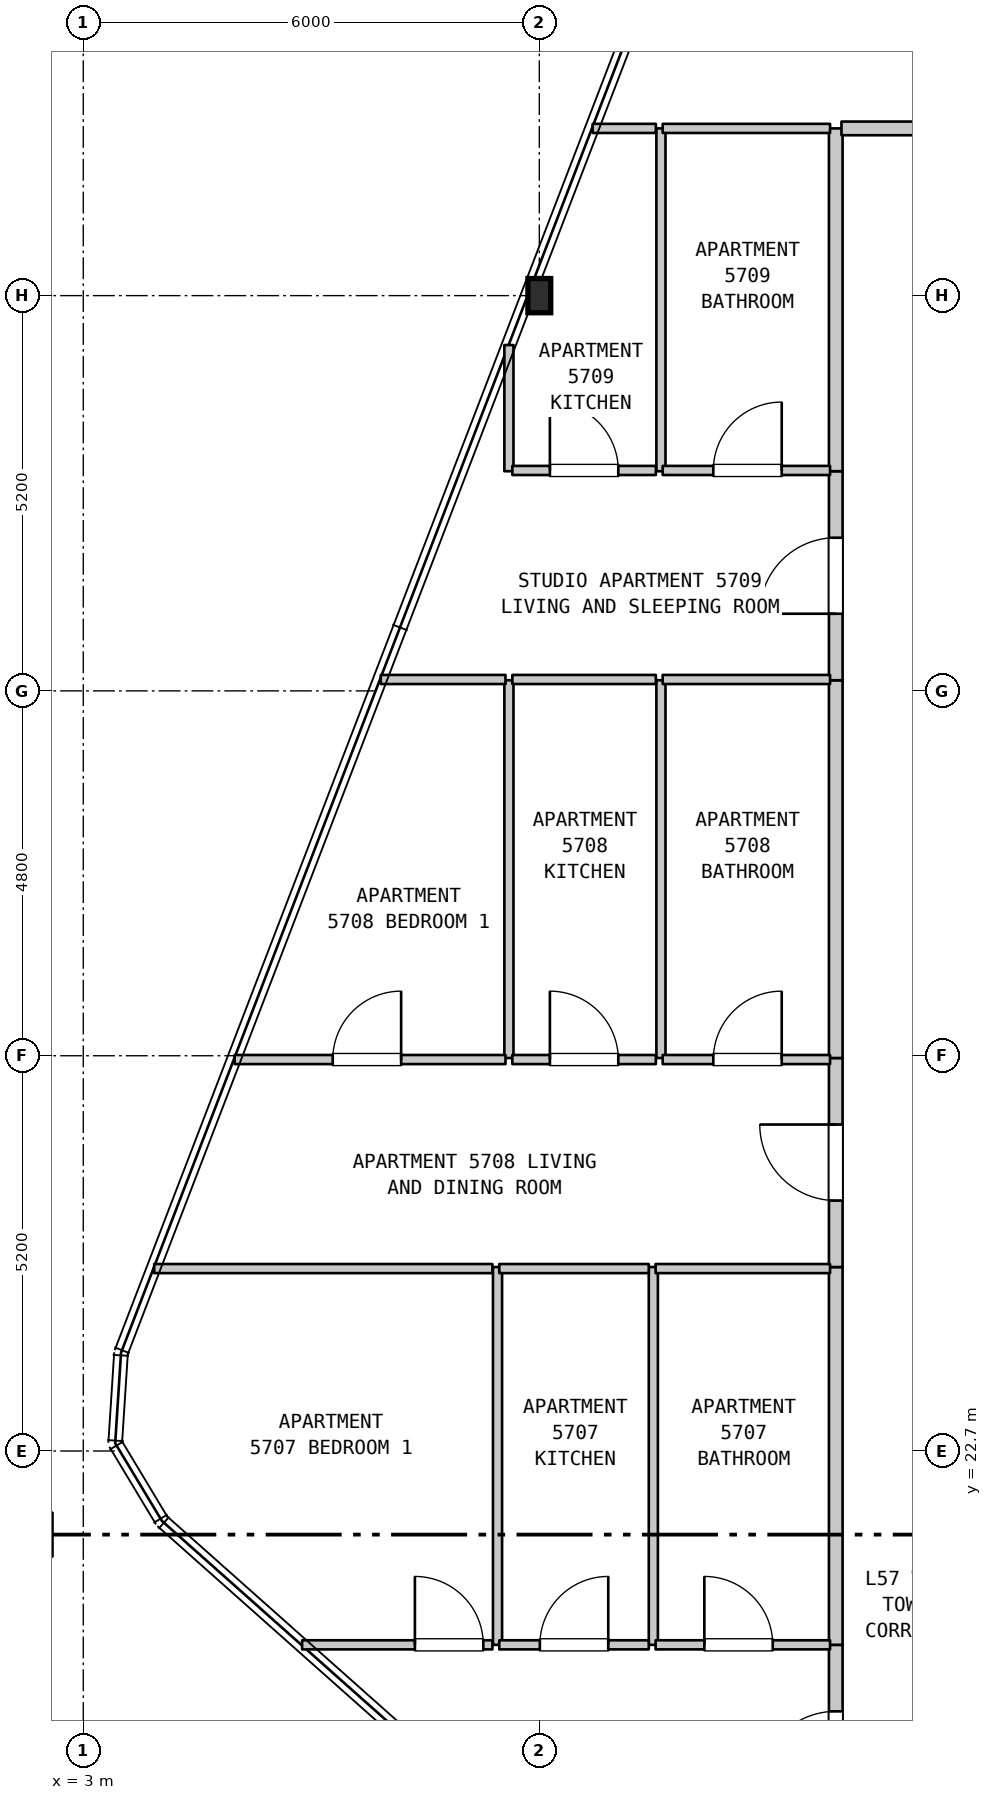
"""IFC4 building model, lengths in metres.
Left out: names, types, materials, properties, quantities, classifications, styles, units other than length and angle.
Written with IfcOpenShell. Run it as: python <this file> out.ifc"""

import sys

from ifc_helpers import new_model, si_unit, direction, frame, frame_2d, origin, origin_2d, place, context, subcontext, project, spatial, rectangle, i_section, extrude, element, fill, save


model = new_model("IFC4")
c1 = context("Model", 3, precision=1e-05, world=origin(), true_north=direction((0.0, 1.0)))
c2 = subcontext(c1, "Body", "Model", "MODEL_VIEW")
j1 = project(units=[si_unit("LENGTHUNIT", "METRE"), si_unit("PLANEANGLEUNIT", "RADIAN")], contexts=[c1])
p1 = place(None, origin())
s1 = spatial("IfcSite", under=j1, at=p1, CompositionType="ELEMENT")
p2 = place(p1, origin())
s2 = spatial("IfcBuilding", under=s1, at=p2, CompositionType="ELEMENT")
p3 = place(p2, frame((0.0, 0.0, 230.2)))
s3 = spatial("IfcBuildingStorey", under=s2, at=p3, CompositionType="ELEMENT", Elevation=230.2)
p4 = place(p3, frame((9.0, 37.9, 0.0), z_axis=(0.0, 0.0, 1.0), x_axis=(1.0, 0.0, 0.0)))
e1 = element("IfcColumn", 1, at=p4, inside=s3, PredefinedType="COLUMN", context=c2, shape_type="SweptSolid", body=[
    extrude(i_section(OverallWidth=0.3, OverallDepth=0.45, WebThickness=0.014, FlangeThickness=0.026, FilletRadius=0.027, at=origin_2d()), origin(), (0.0, 0.0, 1.0), 3.7),
])
p5 = place(p3, frame((8.45, 20.15, 0.0), z_axis=(0.0, 0.0, 1.0), x_axis=(0.0, 1.0, 0.0)))
e2 = element("IfcWall", 2, at=p5, inside=s3, PredefinedType="PARTITIONING", context=c2, shape_type="SweptSolid", body=[
    extrude(rectangle(XDim=4.97, YDim=0.12, at=frame_2d((2.485, 0.0))), origin(), (0.0, 0.0, 1.0), 3.39),
])
p6 = place(p3, frame((8.6, 27.87, 0.0), z_axis=(0.0, 0.0, 1.0), x_axis=(0.0, 1.0, 0.0)))
e3 = element("IfcWall", 3, at=p6, inside=s3, PredefinedType="PARTITIONING", context=c2, shape_type="SweptSolid", body=[
    extrude(rectangle(XDim=4.97, YDim=0.12, at=frame_2d((2.485, 0.0))), origin(), (0.0, 0.0, 1.0), 3.39),
])
p7 = place(p3, frame((8.6, 35.59, 0.0), z_axis=(0.0, 0.0, 1.0), x_axis=(0.0, 1.0, 0.0)))
e4 = element("IfcWall", 4, at=p7, inside=s3, PredefinedType="PARTITIONING", context=c2, shape_type="SweptSolid", body=[
    extrude(rectangle(XDim=1.66, YDim=0.12, at=frame_2d((0.83, 0.0))), origin(), (0.0, 0.0, 1.0), 3.39),
])
p8 = place(p3, frame((10.5, 20.15, 0.0), z_axis=(0.0, 0.0, 1.0), x_axis=(0.0, 1.0, 0.0)))
e5 = element("IfcWall", 5, at=p8, inside=s3, PredefinedType="PARTITIONING", context=c2, shape_type="SweptSolid", body=[
    extrude(rectangle(XDim=4.97, YDim=0.12, at=frame_2d((2.485, 0.0))), origin(), (0.0, 0.0, 1.0), 3.39),
])
p9 = place(p3, frame((10.6, 27.87, 0.0), z_axis=(0.0, 0.0, 1.0), x_axis=(0.0, 1.0, 0.0)))
e6 = element("IfcWall", 6, at=p9, inside=s3, PredefinedType="PARTITIONING", context=c2, shape_type="SweptSolid", body=[
    extrude(rectangle(XDim=4.97, YDim=0.12, at=frame_2d((2.485, 0.0))), origin(), (0.0, 0.0, 1.0), 3.39),
])
p10 = place(p3, frame((10.6, 35.59, 0.0), z_axis=(0.0, 0.0, 1.0), x_axis=(0.0, 1.0, 0.0)))
e7 = element("IfcWall", 7, at=p10, inside=s3, PredefinedType="PARTITIONING", context=c2, shape_type="SweptSolid", body=[
    extrude(rectangle(XDim=4.51, YDim=0.12, at=frame_2d((2.255, 0.0))), origin(), (0.0, 0.0, 1.0), 3.39),
])
p11 = place(p3, frame((12.9, 17.4, 0.0), z_axis=(0.0, 0.0, 1.0), x_axis=(0.0, 1.0, 0.0)))
e8 = element("IfcWall", 8, at=p11, inside=s3, PredefinedType="STANDARD", context=c2, shape_type="SweptSolid", body=[
    extrude(rectangle(XDim=2.75, YDim=0.18, at=frame_2d((1.375, 0.0))), origin(), (0.0, 0.0, 1.0), 3.39),
])
p12 = place(p11, frame((0.875, 0.0, 0.0)))
e9 = element("IfcOpeningElement", 9, at=p12, cuts=e8, PredefinedType="OPENING", context=c2, shape_type="SweptSolid", body=[
    extrude(rectangle(XDim=1.0, YDim=2.15, at=frame_2d((0.5, 1.075))), frame((0.0, 0.1, 0.0), z_axis=(0.0, -1.0, 0.0), x_axis=(1.0, 0.0, 0.0)), (0.0, 0.0, 1.0), 0.2),
])
p13 = place(p3, frame((12.9, 20.15, 0.0), z_axis=(0.0, 0.0, 1.0), x_axis=(0.0, 1.0, 0.0)))
e10 = element("IfcWall", 10, at=p13, inside=s3, PredefinedType="STANDARD", context=c2, shape_type="SweptSolid", body=[
    extrude(rectangle(XDim=4.97, YDim=0.18, at=frame_2d((2.485, 0.0))), origin(), (0.0, 0.0, 1.0), 3.39),
])
p14 = place(p3, frame((12.9, 25.12, 0.0), z_axis=(0.0, 0.0, 1.0), x_axis=(0.0, 1.0, 0.0)))
e11 = element("IfcWall", 11, at=p14, inside=s3, PredefinedType="STANDARD", context=c2, shape_type="SweptSolid", body=[
    extrude(rectangle(XDim=2.75, YDim=0.18, at=frame_2d((1.375, 0.0))), origin(), (0.0, 0.0, 1.0), 3.39),
])
p15 = place(p14, frame((0.875, 0.0, 0.0)))
e12 = element("IfcOpeningElement", 12, at=p15, cuts=e11, PredefinedType="OPENING", context=c2, shape_type="SweptSolid", body=[
    extrude(rectangle(XDim=1.0, YDim=2.15, at=frame_2d((0.5, 1.075))), frame((0.0, 0.1, 0.0), z_axis=(0.0, -1.0, 0.0), x_axis=(1.0, 0.0, 0.0)), (0.0, 0.0, 1.0), 0.2),
])
p16 = place(p3, frame((12.9, 27.87, 0.0), z_axis=(0.0, 0.0, 1.0), x_axis=(0.0, 1.0, 0.0)))
e13 = element("IfcWall", 13, at=p16, inside=s3, PredefinedType="STANDARD", context=c2, shape_type="SweptSolid", body=[
    extrude(rectangle(XDim=4.97, YDim=0.18, at=frame_2d((2.485, 0.0))), origin(), (0.0, 0.0, 1.0), 3.39),
])
p17 = place(p3, frame((12.9, 32.84, 0.0), z_axis=(0.0, 0.0, 1.0), x_axis=(0.0, 1.0, 0.0)))
e14 = element("IfcWall", 14, at=p17, inside=s3, PredefinedType="STANDARD", context=c2, shape_type="SweptSolid", body=[
    extrude(rectangle(XDim=2.75, YDim=0.18, at=frame_2d((1.375, 0.0))), origin(), (0.0, 0.0, 1.0), 3.39),
])
p18 = place(p17, frame((0.875, 0.0, 0.0)))
e15 = element("IfcOpeningElement", 15, at=p18, cuts=e14, PredefinedType="OPENING", context=c2, shape_type="SweptSolid", body=[
    extrude(rectangle(XDim=1.0, YDim=2.15, at=frame_2d((0.5, 1.075))), frame((0.0, 0.1, 0.0), z_axis=(0.0, -1.0, 0.0), x_axis=(1.0, 0.0, 0.0)), (0.0, 0.0, 1.0), 0.2),
])
p19 = place(p3, frame((12.9, 35.59, 0.0), z_axis=(0.0, 0.0, 1.0), x_axis=(0.0, 1.0, 0.0)))
e16 = element("IfcWall", 16, at=p19, inside=s3, PredefinedType="STANDARD", context=c2, shape_type="SweptSolid", body=[
    extrude(rectangle(XDim=4.51, YDim=0.18, at=frame_2d((2.255, 0.0))), origin(), (0.0, 0.0, 1.0), 3.39),
])
p20 = place(p3, frame((5.879, 20.15, 0.0), z_axis=(0.0, 0.0, 1.0), x_axis=(1.0, 0.0, 0.0)))
e17 = element("IfcWall", 17, at=p20, inside=s3, PredefinedType="PARTITIONING", context=c2, shape_type="SweptSolid", body=[
    extrude(rectangle(XDim=2.504, YDim=0.12, at=frame_2d((1.252, 0.0))), origin(), (0.0, 0.0, 1.0), 3.39),
])
p21 = place(p20, frame((1.484, 0.0, 0.0)))
e18 = element("IfcOpeningElement", 18, at=p21, cuts=e17, PredefinedType="OPENING", context=c2, shape_type="SweptSolid", body=[
    extrude(rectangle(XDim=0.9, YDim=2.15, at=frame_2d((0.45, 1.075))), frame((0.0, 0.07, 0.0), z_axis=(0.0, -1.0, 0.0), x_axis=(1.0, 0.0, 0.0)), (0.0, 0.0, 1.0), 0.14),
])
p22 = place(p3, frame((8.473, 20.15, 0.0), z_axis=(0.0, 0.0, 1.0), x_axis=(1.0, 0.0, 0.0)))
e19 = element("IfcWall", 19, at=p22, inside=s3, PredefinedType="PARTITIONING", context=c2, shape_type="SweptSolid", body=[
    extrude(rectangle(XDim=1.967, YDim=0.12, at=frame_2d((0.983, 0.0))), origin(), (0.0, 0.0, 1.0), 3.39),
])
p23 = place(p22, frame((0.534, 0.0, 0.0)))
e20 = element("IfcOpeningElement", 20, at=p23, cuts=e19, PredefinedType="OPENING", context=c2, shape_type="SweptSolid", body=[
    extrude(rectangle(XDim=0.9, YDim=2.15, at=frame_2d((0.45, 1.075))), frame((0.0, 0.07, 0.0), z_axis=(0.0, -1.0, 0.0), x_axis=(1.0, 0.0, 0.0)), (0.0, 0.0, 1.0), 0.14),
])
p24 = place(p3, frame((10.53, 20.15, 0.0), z_axis=(0.0, 0.0, 1.0), x_axis=(1.0, 0.0, 0.0)))
e21 = element("IfcWall", 21, at=p24, inside=s3, PredefinedType="PARTITIONING", context=c2, shape_type="SweptSolid", body=[
    extrude(rectangle(XDim=2.295, YDim=0.12, at=frame_2d((1.147, 0.0))), origin(), (0.0, 0.0, 1.0), 3.39),
])
p25 = place(p24, frame((0.641, 0.0, 0.0)))
e22 = element("IfcOpeningElement", 22, at=p25, cuts=e21, PredefinedType="OPENING", context=c2, shape_type="SweptSolid", body=[
    extrude(rectangle(XDim=0.9, YDim=2.1, at=frame_2d((0.45, 1.05))), frame((0.0, 0.07, 0.0), z_axis=(0.0, -1.0, 0.0), x_axis=(1.0, 0.0, 0.0)), (0.0, 0.0, 1.0), 0.14),
])
p26 = place(p3, frame((3.933, 25.1, 0.0), z_axis=(0.0, 0.0, 1.0), x_axis=(1.0, 0.0, 0.0)))
e23 = element("IfcWall", 23, at=p26, inside=s3, PredefinedType="PARTITIONING", context=c2, shape_type="SweptSolid", body=[
    extrude(rectangle(XDim=4.45, YDim=0.12, at=frame_2d((2.225, 0.0))), origin(), (0.0, 0.0, 1.0), 3.39),
])
p27 = place(p3, frame((8.473, 25.1, 0.0), z_axis=(0.0, 0.0, 1.0), x_axis=(1.0, 0.0, 0.0)))
e24 = element("IfcWall", 24, at=p27, inside=s3, PredefinedType="PARTITIONING", context=c2, shape_type="SweptSolid", body=[
    extrude(rectangle(XDim=1.967, YDim=0.12, at=frame_2d((0.983, 0.0))), origin(), (0.0, 0.0, 1.0), 3.39),
])
p28 = place(p3, frame((10.53, 25.1, 0.0), z_axis=(0.0, 0.0, 1.0), x_axis=(1.0, 0.0, 0.0)))
e25 = element("IfcWall", 25, at=p28, inside=s3, PredefinedType="PARTITIONING", context=c2, shape_type="SweptSolid", body=[
    extrude(rectangle(XDim=2.295, YDim=0.12, at=frame_2d((1.147, 0.0))), origin(), (0.0, 0.0, 1.0), 3.39),
])
p29 = place(p3, frame((4.991, 27.85, 0.0), z_axis=(0.0, 0.0, 1.0), x_axis=(1.0, 0.0, 0.0)))
e26 = element("IfcWall", 26, at=p29, inside=s3, PredefinedType="PARTITIONING", context=c2, shape_type="SweptSolid", body=[
    extrude(rectangle(XDim=3.564, YDim=0.12, at=frame_2d((1.782, 0.0))), origin(), (0.0, 0.0, 1.0), 3.39),
])
p30 = place(p29, frame((1.291, 0.0, 0.0)))
e27 = element("IfcOpeningElement", 27, at=p30, cuts=e26, PredefinedType="OPENING", context=c2, shape_type="SweptSolid", body=[
    extrude(rectangle(XDim=0.9, YDim=2.15, at=frame_2d((0.45, 1.075))), frame((0.0, 0.07, 0.0), z_axis=(0.0, -1.0, 0.0), x_axis=(1.0, 0.0, 0.0)), (0.0, 0.0, 1.0), 0.14),
])
p31 = place(p3, frame((8.645, 27.85, 0.0), z_axis=(0.0, 0.0, 1.0), x_axis=(1.0, 0.0, 0.0)))
e28 = element("IfcWall", 28, at=p31, inside=s3, PredefinedType="PARTITIONING", context=c2, shape_type="SweptSolid", body=[
    extrude(rectangle(XDim=1.888, YDim=0.12, at=frame_2d((0.944, 0.0))), origin(), (0.0, 0.0, 1.0), 3.39),
])
p32 = place(p31, frame((0.494, 0.0, 0.0)))
e29 = element("IfcOpeningElement", 29, at=p32, cuts=e28, PredefinedType="OPENING", context=c2, shape_type="SweptSolid", body=[
    extrude(rectangle(XDim=0.9, YDim=2.15, at=frame_2d((0.45, 1.075))), frame((0.0, 0.07, 0.0), z_axis=(0.0, -1.0, 0.0), x_axis=(1.0, 0.0, 0.0)), (0.0, 0.0, 1.0), 0.14),
])
p33 = place(p3, frame((10.623, 27.85, 0.0), z_axis=(0.0, 0.0, 1.0), x_axis=(1.0, 0.0, 0.0)))
e30 = element("IfcWall", 30, at=p33, inside=s3, PredefinedType="PARTITIONING", context=c2, shape_type="SweptSolid", body=[
    extrude(rectangle(XDim=2.202, YDim=0.12, at=frame_2d((1.101, 0.0))), origin(), (0.0, 0.0, 1.0), 3.39),
])
p34 = place(p33, frame((0.666, 0.0, 0.0)))
e31 = element("IfcOpeningElement", 31, at=p34, cuts=e30, PredefinedType="OPENING", context=c2, shape_type="SweptSolid", body=[
    extrude(rectangle(XDim=0.9, YDim=2.1, at=frame_2d((0.45, 1.05))), frame((0.0, 0.07, 0.0), z_axis=(0.0, -1.0, 0.0), x_axis=(1.0, 0.0, 0.0)), (0.0, 0.0, 1.0), 0.14),
])
p35 = place(p3, frame((6.914, 32.85, 0.0), z_axis=(0.0, 0.0, 1.0), x_axis=(1.0, 0.0, 0.0)))
e32 = element("IfcWall", 32, at=p35, inside=s3, PredefinedType="PARTITIONING", context=c2, shape_type="SweptSolid", body=[
    extrude(rectangle(XDim=1.641, YDim=0.12, at=frame_2d((0.82, 0.0))), origin(), (0.0, 0.0, 1.0), 3.39),
])
p36 = place(p3, frame((8.645, 32.85, 0.0), z_axis=(0.0, 0.0, 1.0), x_axis=(1.0, 0.0, 0.0)))
e33 = element("IfcWall", 33, at=p36, inside=s3, PredefinedType="PARTITIONING", context=c2, shape_type="SweptSolid", body=[
    extrude(rectangle(XDim=1.888, YDim=0.12, at=frame_2d((0.944, 0.0))), origin(), (0.0, 0.0, 1.0), 3.39),
])
p37 = place(p3, frame((10.623, 32.85, 0.0), z_axis=(0.0, 0.0, 1.0), x_axis=(1.0, 0.0, 0.0)))
e34 = element("IfcWall", 34, at=p37, inside=s3, PredefinedType="PARTITIONING", context=c2, shape_type="SweptSolid", body=[
    extrude(rectangle(XDim=2.202, YDim=0.12, at=frame_2d((1.101, 0.0))), origin(), (0.0, 0.0, 1.0), 3.39),
])
p38 = place(p3, frame((8.645, 35.6, 0.0), z_axis=(0.0, 0.0, 1.0), x_axis=(1.0, 0.0, 0.0)))
e35 = element("IfcWall", 35, at=p38, inside=s3, PredefinedType="PARTITIONING", context=c2, shape_type="SweptSolid", body=[
    extrude(rectangle(XDim=1.888, YDim=0.12, at=frame_2d((0.944, 0.0))), origin(), (0.0, 0.0, 1.0), 3.39),
])
p39 = place(p38, frame((0.494, 0.0, 0.0)))
e36 = element("IfcOpeningElement", 36, at=p39, cuts=e35, PredefinedType="OPENING", context=c2, shape_type="SweptSolid", body=[
    extrude(rectangle(XDim=0.9, YDim=2.15, at=frame_2d((0.45, 1.075))), frame((0.0, 0.07, 0.0), z_axis=(0.0, -1.0, 0.0), x_axis=(1.0, 0.0, 0.0)), (0.0, 0.0, 1.0), 0.14),
])
p40 = place(p3, frame((10.623, 35.6, 0.0), z_axis=(0.0, 0.0, 1.0), x_axis=(1.0, 0.0, 0.0)))
e37 = element("IfcWall", 37, at=p40, inside=s3, PredefinedType="PARTITIONING", context=c2, shape_type="SweptSolid", body=[
    extrude(rectangle(XDim=2.202, YDim=0.12, at=frame_2d((1.101, 0.0))), origin(), (0.0, 0.0, 1.0), 3.39),
])
p41 = place(p40, frame((0.666, 0.0, 0.0)))
e38 = element("IfcOpeningElement", 38, at=p41, cuts=e37, PredefinedType="OPENING", context=c2, shape_type="SweptSolid", body=[
    extrude(rectangle(XDim=0.9, YDim=2.1, at=frame_2d((0.45, 1.05))), frame((0.0, 0.07, 0.0), z_axis=(0.0, -1.0, 0.0), x_axis=(1.0, 0.0, 0.0)), (0.0, 0.0, 1.0), 0.14),
])
p42 = place(p3, frame((9.702, 40.1, 0.0), z_axis=(0.0, 0.0, 1.0), x_axis=(1.0, 0.0, 0.0)))
e39 = element("IfcWall", 39, at=p42, inside=s3, PredefinedType="PARTITIONING", context=c2, shape_type="SweptSolid", body=[
    extrude(rectangle(XDim=0.831, YDim=0.12, at=frame_2d((0.416, 0.0))), origin(), (0.0, 0.0, 1.0), 3.39),
])
p43 = place(p3, frame((10.623, 40.1, 0.0), z_axis=(0.0, 0.0, 1.0), x_axis=(1.0, 0.0, 0.0)))
e40 = element("IfcWall", 40, at=p43, inside=s3, PredefinedType="PARTITIONING", context=c2, shape_type="SweptSolid", body=[
    extrude(rectangle(XDim=2.202, YDim=0.12, at=frame_2d((1.101, 0.0))), origin(), (0.0, 0.0, 1.0), 3.39),
])
p44 = place(p3, frame((12.975, 40.1, 0.0), z_axis=(0.0, 0.0, 1.0), x_axis=(1.0, 0.0, 0.0)))
e41 = element("IfcWall", 41, at=p44, inside=s3, PredefinedType="STANDARD", context=c2, shape_type="SweptSolid", body=[
    extrude(rectangle(XDim=4.58, YDim=0.18, at=frame_2d((2.29, 0.0))), origin(), (0.0, 0.0, 1.0), 3.39),
])
p45 = place(p44, frame((1.775, 0.0, 0.0)))
e42 = element("IfcOpeningElement", 42, at=p45, cuts=e41, PredefinedType="OPENING", context=c2, shape_type="SweptSolid", body=[
    extrude(rectangle(XDim=1.0, YDim=2.15, at=frame_2d((0.5, 1.075))), frame((0.0, 0.1, 0.0), z_axis=(0.0, -1.0, 0.0), x_axis=(1.0, 0.0, 0.0)), (0.0, 0.0, 1.0), 0.2),
])
p46 = place(p12, origin())
e43 = element("IfcDoor", 43, at=p46, inside=s3, OperationType="SINGLE_SWING_LEFT", PredefinedType="DOOR", context=c2, shape_type="SweptSolid", body=[
    extrude(rectangle(XDim=1.0, YDim=2.15, at=frame_2d((0.5, 1.075))), frame((0.0, 0.025, 0.0), z_axis=(0.0, -1.0, 0.0), x_axis=(1.0, 0.0, 0.0)), (0.0, 0.0, 1.0), 0.05),
])
fill(e9, e43)
p47 = place(p15, origin())
e44 = element("IfcDoor", 44, at=p47, inside=s3, OperationType="SINGLE_SWING_RIGHT", PredefinedType="DOOR", context=c2, shape_type="SweptSolid", body=[
    extrude(rectangle(XDim=1.0, YDim=2.15, at=frame_2d((0.5, 1.075))), frame((0.0, 0.025, 0.0), z_axis=(0.0, -1.0, 0.0), x_axis=(1.0, 0.0, 0.0)), (0.0, 0.0, 1.0), 0.05),
])
fill(e12, e44)
p48 = place(p18, origin())
e45 = element("IfcDoor", 45, at=p48, inside=s3, OperationType="SINGLE_SWING_LEFT", PredefinedType="DOOR", context=c2, shape_type="SweptSolid", body=[
    extrude(rectangle(XDim=1.0, YDim=2.15, at=frame_2d((0.5, 1.075))), frame((0.0, 0.025, 0.0), z_axis=(0.0, -1.0, 0.0), x_axis=(1.0, 0.0, 0.0)), (0.0, 0.0, 1.0), 0.05),
])
fill(e15, e45)
p49 = place(p21, origin())
e46 = element("IfcDoor", 46, at=p49, inside=s3, OperationType="SINGLE_SWING_LEFT", PredefinedType="DOOR", context=c2, shape_type="SweptSolid", body=[
    extrude(rectangle(XDim=0.9, YDim=2.15, at=frame_2d((0.45, 1.075))), frame((0.0, 0.025, 0.0), z_axis=(0.0, -1.0, 0.0), x_axis=(1.0, 0.0, 0.0)), (0.0, 0.0, 1.0), 0.05),
])
fill(e18, e46)
p50 = place(p23, origin())
e47 = element("IfcDoor", 47, at=p50, inside=s3, OperationType="SINGLE_SWING_RIGHT", PredefinedType="DOOR", context=c2, shape_type="SweptSolid", body=[
    extrude(rectangle(XDim=0.9, YDim=2.15, at=frame_2d((0.45, 1.075))), frame((0.0, 0.025, 0.0), z_axis=(0.0, -1.0, 0.0), x_axis=(1.0, 0.0, 0.0)), (0.0, 0.0, 1.0), 0.05),
])
fill(e20, e47)
p51 = place(p25, origin())
e48 = element("IfcDoor", 48, at=p51, inside=s3, OperationType="SINGLE_SWING_LEFT", PredefinedType="DOOR", context=c2, shape_type="SweptSolid", body=[
    extrude(rectangle(XDim=0.9, YDim=2.1, at=frame_2d((0.45, 1.05))), frame((0.0, 0.025, 0.0), z_axis=(0.0, -1.0, 0.0), x_axis=(1.0, 0.0, 0.0)), (0.0, 0.0, 1.0), 0.05),
])
fill(e22, e48)
p52 = place(p30, origin())
e49 = element("IfcDoor", 49, at=p52, inside=s3, OperationType="SINGLE_SWING_RIGHT", PredefinedType="DOOR", context=c2, shape_type="SweptSolid", body=[
    extrude(rectangle(XDim=0.9, YDim=2.15, at=frame_2d((0.45, 1.075))), frame((0.0, 0.025, 0.0), z_axis=(0.0, -1.0, 0.0), x_axis=(1.0, 0.0, 0.0)), (0.0, 0.0, 1.0), 0.05),
])
fill(e27, e49)
p53 = place(p32, origin())
e50 = element("IfcDoor", 50, at=p53, inside=s3, OperationType="SINGLE_SWING_LEFT", PredefinedType="DOOR", context=c2, shape_type="SweptSolid", body=[
    extrude(rectangle(XDim=0.9, YDim=2.15, at=frame_2d((0.45, 1.075))), frame((0.0, 0.025, 0.0), z_axis=(0.0, -1.0, 0.0), x_axis=(1.0, 0.0, 0.0)), (0.0, 0.0, 1.0), 0.05),
])
fill(e29, e50)
p54 = place(p34, origin())
e51 = element("IfcDoor", 51, at=p54, inside=s3, OperationType="SINGLE_SWING_RIGHT", PredefinedType="DOOR", context=c2, shape_type="SweptSolid", body=[
    extrude(rectangle(XDim=0.9, YDim=2.1, at=frame_2d((0.45, 1.05))), frame((0.0, 0.025, 0.0), z_axis=(0.0, -1.0, 0.0), x_axis=(1.0, 0.0, 0.0)), (0.0, 0.0, 1.0), 0.05),
])
fill(e31, e51)
p55 = place(p39, origin())
e52 = element("IfcDoor", 52, at=p55, inside=s3, OperationType="SINGLE_SWING_LEFT", PredefinedType="DOOR", context=c2, shape_type="SweptSolid", body=[
    extrude(rectangle(XDim=0.9, YDim=2.15, at=frame_2d((0.45, 1.075))), frame((0.0, 0.025, 0.0), z_axis=(0.0, -1.0, 0.0), x_axis=(1.0, 0.0, 0.0)), (0.0, 0.0, 1.0), 0.05),
])
fill(e36, e52)
p56 = place(p41, origin())
e53 = element("IfcDoor", 53, at=p56, inside=s3, OperationType="SINGLE_SWING_RIGHT", PredefinedType="DOOR", context=c2, shape_type="SweptSolid", body=[
    extrude(rectangle(XDim=0.9, YDim=2.1, at=frame_2d((0.45, 1.05))), frame((0.0, 0.025, 0.0), z_axis=(0.0, -1.0, 0.0), x_axis=(1.0, 0.0, 0.0)), (0.0, 0.0, 1.0), 0.05),
])
fill(e38, e53)
save(model, sys.argv[1])
